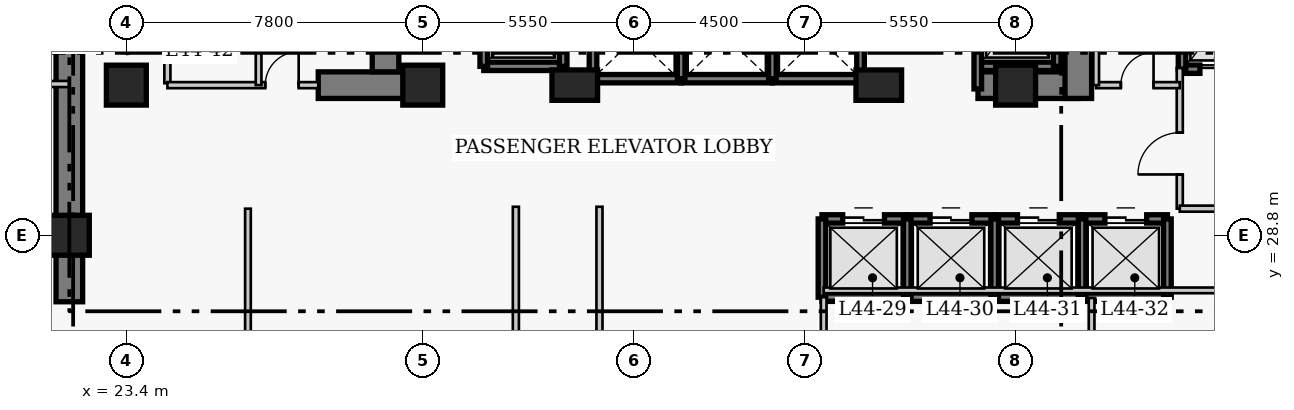
"""IFC4 building model, lengths in metres.
Left out: names, types, materials, properties, quantities, classifications, styles, units other than length and angle.
Written with IfcOpenShell. Run it as: python <this file> out.ifc"""

import sys

from ifc_helpers import new_model, si_unit, direction, frame, frame_2d, origin, origin_2d, place, context, subcontext, project, spatial, rectangle, extrude, element, fill, save


model = new_model("IFC4")
c1 = context("Model", 3, precision=1e-05, world=origin(), true_north=direction((0.0, 1.0)))
c2 = subcontext(c1, "Body", "Model", "MODEL_VIEW")
j1 = project(units=[si_unit("LENGTHUNIT", "METRE"), si_unit("PLANEANGLEUNIT", "RADIAN")], contexts=[c1])
p1 = place(None, origin())
s1 = spatial("IfcSite", under=j1, at=p1, CompositionType="ELEMENT")
p2 = place(p1, origin())
s2 = spatial("IfcBuilding", under=s1, at=p2, CompositionType="ELEMENT")
p3 = place(p2, frame((0.0, 0.0, 176.4)))
s3 = spatial("IfcBuildingStorey", under=s2, at=p3, CompositionType="ELEMENT", Elevation=176.4)
p4 = place(p3, frame((21.9, 27.05, 0.0), z_axis=(0.0, 0.0, 1.0), x_axis=(0.0, 1.0, 0.0)))
e1 = element("IfcWall", 1, at=p4, inside=s3, PredefinedType="SHEAR", context=c2, shape_type="SweptSolid", body=[
    extrude(rectangle(XDim=13.62, YDim=0.7, at=frame_2d((6.81, 0.0))), origin(), (0.0, 0.0, 1.0), 3.8),
])
p5 = place(p3, frame((28.45, 32.75, 0.0), z_axis=(0.0, 0.0, 1.0), x_axis=(1.0, 0.0, 0.0)))
e2 = element("IfcWall", 2, at=p5, inside=s3, PredefinedType="SHEAR", context=c2, shape_type="SweptSolid", body=[
    extrude(rectangle(XDim=2.4, YDim=0.7, at=frame_2d((1.2, 0.0))), origin(), (0.0, 0.0, 1.0), 3.8),
])
p6 = place(p3, frame((45.81, 32.75, 0.0), z_axis=(0.0, 0.0, 1.0), x_axis=(1.0, 0.0, 0.0)))
e3 = element("IfcWall", 3, at=p6, inside=s3, PredefinedType="SHEAR", context=c2, shape_type="SweptSolid", body=[
    extrude(rectangle(XDim=2.64, YDim=0.7, at=frame_2d((1.32, 0.0))), origin(), (0.0, 0.0, 1.0), 3.8),
])
p7 = place(p3, frame((30.22, 33.1, 0.0), z_axis=(0.0, 0.0, 1.0), x_axis=(0.0, 1.0, 0.0)))
e4 = element("IfcWall", 4, at=p7, inside=s3, PredefinedType="SHEAR", context=c2, shape_type="SweptSolid", body=[
    extrude(rectangle(XDim=7.22, YDim=0.7, at=frame_2d((3.61, 0.0))), origin(), (0.0, 0.0, 1.0), 3.8),
])
p8 = place(p3, frame((48.45, 32.4, 0.0), z_axis=(0.0, 0.0, 1.0), x_axis=(0.0, 1.0, 0.0)))
e5 = element("IfcWall", 5, at=p8, inside=s3, PredefinedType="SHEAR", context=c2, shape_type="SweptSolid", body=[
    extrude(rectangle(XDim=7.92, YDim=0.7, at=frame_2d((3.96, 0.0))), origin(), (0.0, 0.0, 1.0), 3.8),
])
p9 = place(p8, frame((5.8, 0.0, 0.0)))
e6 = element("IfcOpeningElement", 6, at=p9, cuts=e5, PredefinedType="OPENING", context=c2, shape_type="SweptSolid", body=[
    extrude(rectangle(XDim=1.1, YDim=2.15, at=frame_2d((0.55, 1.075))), frame((0.0, 0.36, 0.0), z_axis=(0.0, -1.0, 0.0), x_axis=(1.0, 0.0, 0.0)), (0.0, 0.0, 1.0), 0.72),
])
for number, where, z_axis, x_axis in (
    (7, (21.9, 28.8, 0.0), (0.0, 0.0, 1.0), (1.0, 0.0, 0.0)),
    (8, (23.4, 32.75, 0.0), (0.0, 0.0, 1.0), (1.0, 0.0, 0.0)),
    (9, (31.2, 32.75, 0.0), (0.0, 0.0, 1.0), (1.0, 0.0, 0.0)),
):
    element("IfcColumn", number, at=place(p3, frame(where, z_axis=z_axis, x_axis=x_axis)), inside=s3, PredefinedType="COLUMN", context=c2, shape_type="SweptSolid", body=[
        extrude(rectangle(XDim=1.05, YDim=1.05, at=origin_2d()), origin(), (0.0, 0.0, 1.0), 3.8),
    ])
for number, where, z_axis, x_axis in (
    (10, (35.2, 32.75, 0.0), (0.0, 0.0, 1.0), (1.0, 0.0, 0.0)),
    (11, (43.2, 32.75, 0.0), (0.0, 0.0, 1.0), (1.0, 0.0, 0.0)),
):
    element("IfcColumn", number, at=place(p3, frame(where, z_axis=z_axis, x_axis=x_axis)), inside=s3, PredefinedType="COLUMN", context=c2, shape_type="SweptSolid", body=[
        extrude(rectangle(XDim=1.2, YDim=0.8, at=origin_2d()), origin(), (0.0, 0.0, 1.0), 3.8),
    ])
p10 = place(p3, frame((46.8, 32.75, 0.0), z_axis=(0.0, 0.0, 1.0), x_axis=(1.0, 0.0, 0.0)))
e12 = element("IfcColumn", 12, at=p10, inside=s3, PredefinedType="COLUMN", context=c2, shape_type="SweptSolid", body=[
    extrude(rectangle(XDim=1.05, YDim=1.05, at=origin_2d()), origin(), (0.0, 0.0, 1.0), 3.8),
])
p11 = place(p3, frame((41.705, 29.23, 0.0), z_axis=(0.0, 0.0, 1.0), x_axis=(1.0, 0.0, 0.0)))
e13 = element("IfcWall", 13, at=p11, inside=s3, PredefinedType="SHEAR", context=c2, shape_type="SweptSolid", body=[
    extrude(rectangle(XDim=2.245, YDim=0.22, at=frame_2d((1.123, 0.0))), origin(), (0.0, 0.0, 1.0), 3.8),
])
p12 = place(p11, frame((0.545, 0.0, 0.0)))
e14 = element("IfcOpeningElement", 14, at=p12, cuts=e13, PredefinedType="OPENING", context=c2, shape_type="SweptSolid", body=[
    extrude(rectangle(XDim=1.1, YDim=2.15, at=frame_2d((0.55, 1.075))), frame((0.0, 0.12, 0.0), z_axis=(0.0, -1.0, 0.0), x_axis=(1.0, 0.0, 0.0)), (0.0, 0.0, 1.0), 0.24),
])
p13 = place(p3, frame((41.705, 27.17, 0.0), z_axis=(0.0, 0.0, 1.0), x_axis=(1.0, 0.0, 0.0)))
e15 = element("IfcWall", 15, at=p13, inside=s3, PredefinedType="SHEAR", context=c2, shape_type="SweptSolid", body=[
    extrude(rectangle(XDim=2.245, YDim=0.22, at=frame_2d((1.123, 0.0))), origin(), (0.0, 0.0, 1.0), 3.8),
])
p14 = place(p3, frame((41.705, 27.17, 0.0), z_axis=(0.0, 0.0, 1.0), x_axis=(0.0, 1.0, 0.0)))
e16 = element("IfcWall", 16, at=p14, inside=s3, PredefinedType="SHEAR", context=c2, shape_type="SweptSolid", body=[
    extrude(rectangle(XDim=2.06, YDim=0.2, at=frame_2d((1.03, 0.0))), origin(), (0.0, 0.0, 1.0), 3.8),
])
p15 = place(p3, frame((43.95, 29.23, 0.0), z_axis=(0.0, 0.0, 1.0), x_axis=(1.0, 0.0, 0.0)))
e17 = element("IfcWall", 17, at=p15, inside=s3, PredefinedType="SHEAR", context=c2, shape_type="SweptSolid", body=[
    extrude(rectangle(XDim=2.3, YDim=0.22, at=frame_2d((1.15, 0.0))), origin(), (0.0, 0.0, 1.0), 3.8),
])
p16 = place(p15, frame((0.6, 0.0, 0.0)))
e18 = element("IfcOpeningElement", 18, at=p16, cuts=e17, PredefinedType="OPENING", context=c2, shape_type="SweptSolid", body=[
    extrude(rectangle(XDim=1.1, YDim=2.15, at=frame_2d((0.55, 1.075))), frame((0.0, 0.12, 0.0), z_axis=(0.0, -1.0, 0.0), x_axis=(1.0, 0.0, 0.0)), (0.0, 0.0, 1.0), 0.24),
])
p17 = place(p3, frame((43.95, 27.17, 0.0), z_axis=(0.0, 0.0, 1.0), x_axis=(1.0, 0.0, 0.0)))
e19 = element("IfcWall", 19, at=p17, inside=s3, PredefinedType="SHEAR", context=c2, shape_type="SweptSolid", body=[
    extrude(rectangle(XDim=2.3, YDim=0.22, at=frame_2d((1.15, 0.0))), origin(), (0.0, 0.0, 1.0), 3.8),
])
p18 = place(p3, frame((43.95, 27.17, 0.0), z_axis=(0.0, 0.0, 1.0), x_axis=(0.0, 1.0, 0.0)))
e20 = element("IfcWall", 20, at=p18, inside=s3, PredefinedType="SHEAR", context=c2, shape_type="SweptSolid", body=[
    extrude(rectangle(XDim=2.06, YDim=0.2, at=frame_2d((1.03, 0.0))), origin(), (0.0, 0.0, 1.0), 3.8),
])
p19 = place(p3, frame((46.25, 29.23, 0.0), z_axis=(0.0, 0.0, 1.0), x_axis=(1.0, 0.0, 0.0)))
e21 = element("IfcWall", 21, at=p19, inside=s3, PredefinedType="SHEAR", context=c2, shape_type="SweptSolid", body=[
    extrude(rectangle(XDim=2.3, YDim=0.22, at=frame_2d((1.15, 0.0))), origin(), (0.0, 0.0, 1.0), 3.8),
])
p20 = place(p19, frame((0.6, 0.0, 0.0)))
e22 = element("IfcOpeningElement", 22, at=p20, cuts=e21, PredefinedType="OPENING", context=c2, shape_type="SweptSolid", body=[
    extrude(rectangle(XDim=1.1, YDim=2.15, at=frame_2d((0.55, 1.075))), frame((0.0, 0.12, 0.0), z_axis=(0.0, -1.0, 0.0), x_axis=(1.0, 0.0, 0.0)), (0.0, 0.0, 1.0), 0.24),
])
p21 = place(p3, frame((46.25, 27.17, 0.0), z_axis=(0.0, 0.0, 1.0), x_axis=(1.0, 0.0, 0.0)))
e23 = element("IfcWall", 23, at=p21, inside=s3, PredefinedType="SHEAR", context=c2, shape_type="SweptSolid", body=[
    extrude(rectangle(XDim=2.3, YDim=0.22, at=frame_2d((1.15, 0.0))), origin(), (0.0, 0.0, 1.0), 3.8),
])
p22 = place(p3, frame((46.25, 27.17, 0.0), z_axis=(0.0, 0.0, 1.0), x_axis=(0.0, 1.0, 0.0)))
e24 = element("IfcWall", 24, at=p22, inside=s3, PredefinedType="SHEAR", context=c2, shape_type="SweptSolid", body=[
    extrude(rectangle(XDim=2.06, YDim=0.2, at=frame_2d((1.03, 0.0))), origin(), (0.0, 0.0, 1.0), 3.8),
])
p23 = place(p3, frame((48.55, 29.23, 0.0), z_axis=(0.0, 0.0, 1.0), x_axis=(1.0, 0.0, 0.0)))
e25 = element("IfcWall", 25, at=p23, inside=s3, PredefinedType="SHEAR", context=c2, shape_type="SweptSolid", body=[
    extrude(rectangle(XDim=2.245, YDim=0.22, at=frame_2d((1.123, 0.0))), origin(), (0.0, 0.0, 1.0), 3.8),
])
p24 = place(p23, frame((0.6, 0.0, 0.0)))
e26 = element("IfcOpeningElement", 26, at=p24, cuts=e25, PredefinedType="OPENING", context=c2, shape_type="SweptSolid", body=[
    extrude(rectangle(XDim=1.1, YDim=2.15, at=frame_2d((0.55, 1.075))), frame((0.0, 0.12, 0.0), z_axis=(0.0, -1.0, 0.0), x_axis=(1.0, 0.0, 0.0)), (0.0, 0.0, 1.0), 0.24),
])
p25 = place(p3, frame((48.55, 27.17, 0.0), z_axis=(0.0, 0.0, 1.0), x_axis=(1.0, 0.0, 0.0)))
e27 = element("IfcWall", 27, at=p25, inside=s3, PredefinedType="SHEAR", context=c2, shape_type="SweptSolid", body=[
    extrude(rectangle(XDim=2.245, YDim=0.22, at=frame_2d((1.123, 0.0))), origin(), (0.0, 0.0, 1.0), 3.8),
])
for number, where, z_axis, x_axis in (
    (28, (48.55, 27.17, 0.0), (0.0, 0.0, 1.0), (0.0, 1.0, 0.0)),
    (29, (50.795, 27.17, 0.0), (0.0, 0.0, 1.0), (0.0, 1.0, 0.0)),
):
    element("IfcWall", number, at=place(p3, frame(where, z_axis=z_axis, x_axis=x_axis)), inside=s3, PredefinedType="SHEAR", context=c2, shape_type="SweptSolid", body=[
        extrude(rectangle(XDim=2.06, YDim=0.2, at=frame_2d((1.03, 0.0))), origin(), (0.0, 0.0, 1.0), 3.8),
    ])
p26 = place(p3, frame((35.68, 32.92, 0.0), z_axis=(0.0, 0.0, 1.0), x_axis=(1.0, 0.0, 0.0)))
e30 = element("IfcWall", 30, at=p26, inside=s3, PredefinedType="SHEAR", context=c2, shape_type="SweptSolid", body=[
    extrude(rectangle(XDim=2.32, YDim=0.22, at=frame_2d((1.16, 0.0))), origin(), (0.0, 0.0, 1.0), 3.8),
])
p27 = place(p3, frame((35.68, 32.92, 0.0), z_axis=(0.0, 0.0, 1.0), x_axis=(0.0, 1.0, 0.0)))
e31 = element("IfcWall", 31, at=p27, inside=s3, PredefinedType="SHEAR", context=c2, shape_type="SweptSolid", body=[
    extrude(rectangle(XDim=2.16, YDim=0.2, at=frame_2d((1.08, 0.0))), origin(), (0.0, 0.0, 1.0), 3.8),
])
p28 = place(p3, frame((38.0, 32.92, 0.0), z_axis=(0.0, 0.0, 1.0), x_axis=(1.0, 0.0, 0.0)))
e32 = element("IfcWall", 32, at=p28, inside=s3, PredefinedType="SHEAR", context=c2, shape_type="SweptSolid", body=[
    extrude(rectangle(XDim=2.4, YDim=0.22, at=frame_2d((1.2, 0.0))), origin(), (0.0, 0.0, 1.0), 3.8),
])
p29 = place(p3, frame((38.0, 32.92, 0.0), z_axis=(0.0, 0.0, 1.0), x_axis=(0.0, 1.0, 0.0)))
e33 = element("IfcWall", 33, at=p29, inside=s3, PredefinedType="SHEAR", context=c2, shape_type="SweptSolid", body=[
    extrude(rectangle(XDim=2.16, YDim=0.2, at=frame_2d((1.08, 0.0))), origin(), (0.0, 0.0, 1.0), 3.8),
])
p30 = place(p3, frame((40.4, 32.92, 0.0), z_axis=(0.0, 0.0, 1.0), x_axis=(1.0, 0.0, 0.0)))
e34 = element("IfcWall", 34, at=p30, inside=s3, PredefinedType="SHEAR", context=c2, shape_type="SweptSolid", body=[
    extrude(rectangle(XDim=2.32, YDim=0.22, at=frame_2d((1.16, 0.0))), origin(), (0.0, 0.0, 1.0), 3.8),
])
for number, where, z_axis, x_axis in (
    (35, (40.4, 32.92, 0.0), (0.0, 0.0, 1.0), (0.0, 1.0, 0.0)),
    (36, (42.72, 32.92, 0.0), (0.0, 0.0, 1.0), (0.0, 1.0, 0.0)),
):
    element("IfcWall", number, at=place(p3, frame(where, z_axis=z_axis, x_axis=x_axis)), inside=s3, PredefinedType="SHEAR", context=c2, shape_type="SweptSolid", body=[
        extrude(rectangle(XDim=2.16, YDim=0.2, at=frame_2d((1.08, 0.0))), origin(), (0.0, 0.0, 1.0), 3.8),
    ])
p31 = place(p3, frame((51.18, 33.17, 0.0), z_axis=(0.0, 0.0, 1.0), x_axis=(1.0, 0.0, 0.0)))
e37 = element("IfcWall", 37, at=p31, inside=s3, PredefinedType="SHEAR", context=c2, shape_type="SweptSolid", body=[
    extrude(rectangle(XDim=2.42, YDim=0.22, at=frame_2d((1.21, 0.0))), origin(), (0.0, 0.0, 1.0), 3.8),
])
p32 = place(p31, frame((0.47, 0.0, 0.0)))
e38 = element("IfcOpeningElement", 38, at=p32, cuts=e37, PredefinedType="OPENING", context=c2, shape_type="SweptSolid", body=[
    extrude(rectangle(XDim=1.3, YDim=2.15, at=frame_2d((0.65, 1.075))), frame((0.0, 0.12, 0.0), z_axis=(0.0, -1.0, 0.0), x_axis=(1.0, 0.0, 0.0)), (0.0, 0.0, 1.0), 0.24),
])
p33 = place(p3, frame((51.18, 33.17, 0.0), z_axis=(0.0, 0.0, 1.0), x_axis=(0.0, 1.0, 0.0)))
e39 = element("IfcWall", 39, at=p33, inside=s3, PredefinedType="SHEAR", context=c2, shape_type="SweptSolid", body=[
    extrude(rectangle(XDim=2.86, YDim=0.2, at=frame_2d((1.43, 0.0))), origin(), (0.0, 0.0, 1.0), 3.8),
])
p34 = place(p3, frame((32.805, 33.245, 0.0), z_axis=(0.0, 0.0, 1.0), x_axis=(1.0, 0.0, 0.0)))
e40 = element("IfcWall", 40, at=p34, inside=s3, PredefinedType="SHEAR", context=c2, shape_type="SweptSolid", body=[
    extrude(rectangle(XDim=2.09, YDim=0.22, at=frame_2d((1.045, 0.0))), origin(), (0.0, 0.0, 1.0), 3.8),
])
for number, where, z_axis, x_axis in (
    (41, (32.805, 33.245, 0.0), (0.0, 0.0, 1.0), (0.0, 1.0, 0.0)),
    (42, (34.895, 33.245, 0.0), (0.0, 0.0, 1.0), (0.0, 1.0, 0.0)),
):
    element("IfcWall", number, at=place(p3, frame(where, z_axis=z_axis, x_axis=x_axis)), inside=s3, PredefinedType="SHEAR", context=c2, shape_type="SweptSolid", body=[
        extrude(rectangle(XDim=2.91, YDim=0.2, at=frame_2d((1.455, 0.0))), origin(), (0.0, 0.0, 1.0), 3.8),
    ])
p35 = place(p3, frame((45.805, 33.245, 0.0), z_axis=(0.0, 0.0, 1.0), x_axis=(1.0, 0.0, 0.0)))
e43 = element("IfcWall", 43, at=p35, inside=s3, PredefinedType="SHEAR", context=c2, shape_type="SweptSolid", body=[
    extrude(rectangle(XDim=2.09, YDim=0.22, at=frame_2d((1.045, 0.0))), origin(), (0.0, 0.0, 1.0), 3.8),
])
p36 = place(p3, frame((45.805, 32.65, 0.0), z_axis=(0.0, 0.0, 1.0), x_axis=(0.0, 1.0, 0.0)))
e44 = element("IfcWall", 44, at=p36, inside=s3, PredefinedType="SHEAR", context=c2, shape_type="SweptSolid", body=[
    extrude(rectangle(XDim=3.505, YDim=0.2, at=frame_2d((1.752, 0.0))), origin(), (0.0, 0.0, 1.0), 3.8),
])
p37 = place(p3, frame((47.895, 33.245, 0.0), z_axis=(0.0, 0.0, 1.0), x_axis=(0.0, 1.0, 0.0)))
e45 = element("IfcWall", 45, at=p37, inside=s3, PredefinedType="SHEAR", context=c2, shape_type="SweptSolid", body=[
    extrude(rectangle(XDim=2.91, YDim=0.2, at=frame_2d((1.455, 0.0))), origin(), (0.0, 0.0, 1.0), 3.8),
])
p38 = place(p3, frame((24.48, 32.8, 0.0), z_axis=(0.0, 0.0, 1.0), x_axis=(0.0, 1.0, 0.0)))
e46 = element("IfcWall", 46, at=p38, inside=s3, PredefinedType="PARTITIONING", context=c2, shape_type="SweptSolid", body=[
    extrude(rectangle(XDim=3.57, YDim=0.16, at=frame_2d((1.785, 0.0))), origin(), (0.0, 0.0, 1.0), 3.55),
])
p39 = place(p38, frame((1.604, 0.0, 0.0)))
e47 = element("IfcOpeningElement", 47, at=p39, cuts=e46, PredefinedType="OPENING", context=c2, shape_type="SweptSolid", body=[
    extrude(rectangle(XDim=0.9, YDim=2.1, at=frame_2d((0.45, 1.05))), frame((0.0, 0.09, 0.0), z_axis=(0.0, -1.0, 0.0), x_axis=(1.0, 0.0, 0.0)), (0.0, 0.0, 1.0), 0.18),
])
p40 = place(p3, frame((51.12, 29.5, 0.0), z_axis=(0.0, 0.0, 1.0), x_axis=(0.0, 1.0, 0.0)))
e48 = element("IfcWall", 48, at=p40, inside=s3, PredefinedType="PARTITIONING", context=c2, shape_type="SweptSolid", body=[
    extrude(rectangle(XDim=3.7, YDim=0.16, at=frame_2d((1.85, 0.0))), origin(), (0.0, 0.0, 1.0), 3.55),
])
p41 = place(p40, frame((0.9, 0.0, 0.0)))
e49 = element("IfcOpeningElement", 49, at=p41, cuts=e48, PredefinedType="OPENING", context=c2, shape_type="SweptSolid", body=[
    extrude(rectangle(XDim=1.1, YDim=2.15, at=frame_2d((0.55, 1.075))), frame((0.0, 0.09, 0.0), z_axis=(0.0, -1.0, 0.0), x_axis=(1.0, 0.0, 0.0)), (0.0, 0.0, 1.0), 0.18),
])
p42 = place(p3, frame((51.12, 29.5, 0.0), z_axis=(0.0, 0.0, 1.0), x_axis=(1.0, 0.0, 0.0)))
e50 = element("IfcWall", 50, at=p42, inside=s3, PredefinedType="PARTITIONING", context=c2, shape_type="SweptSolid", body=[
    extrude(rectangle(XDim=5.63, YDim=0.16, at=frame_2d((2.815, 0.0))), origin(), (0.0, 0.0, 1.0), 3.55),
])
p43 = place(p3, frame((24.48, 32.75, 0.0), z_axis=(0.0, 0.0, 1.0), x_axis=(1.0, 0.0, 0.0)))
e51 = element("IfcWall", 51, at=p43, inside=s3, PredefinedType="PARTITIONING", context=c2, shape_type="SweptSolid", body=[
    extrude(rectangle(XDim=3.97, YDim=0.16, at=frame_2d((1.985, 0.0))), origin(), (0.0, 0.0, 1.0), 3.55),
])
p44 = place(p43, frame((2.575, 0.0, 0.0)))
e52 = element("IfcOpeningElement", 52, at=p44, cuts=e51, PredefinedType="OPENING", context=c2, shape_type="SweptSolid", body=[
    extrude(rectangle(XDim=0.88, YDim=2.05, at=frame_2d((0.44, 1.025))), frame((0.0, 0.09, 0.0), z_axis=(0.0, -1.0, 0.0), x_axis=(1.0, 0.0, 0.0)), (0.0, 0.0, 1.0), 0.18),
])
p45 = place(p3, frame((48.92, 32.75, 0.0), z_axis=(0.0, 0.0, 1.0), x_axis=(1.0, 0.0, 0.0)))
e53 = element("IfcWall", 53, at=p45, inside=s3, PredefinedType="PARTITIONING", context=c2, shape_type="SweptSolid", body=[
    extrude(rectangle(XDim=2.2, YDim=0.16, at=frame_2d((1.1, 0.0))), origin(), (0.0, 0.0, 1.0), 3.55),
])
p46 = place(p45, frame((0.65, 0.0, 0.0)))
e54 = element("IfcOpeningElement", 54, at=p46, cuts=e53, PredefinedType="OPENING", context=c2, shape_type="SweptSolid", body=[
    extrude(rectangle(XDim=0.86, YDim=2.05, at=frame_2d((0.43, 1.025))), frame((0.0, 0.09, 0.0), z_axis=(0.0, -1.0, 0.0), x_axis=(1.0, 0.0, 0.0)), (0.0, 0.0, 1.0), 0.18),
])
for number, where, z_axis, x_axis in (
    (55, (48.92, 32.75, 0.0), (0.0, 0.0, 1.0), (0.0, 1.0, 0.0)),
    (56, (26.88, 32.75, 0.0), (0.0, 0.0, 1.0), (0.0, 1.0, 0.0)),
):
    element("IfcWall", number, at=place(p3, frame(where, z_axis=z_axis, x_axis=x_axis)), inside=s3, PredefinedType="PARTITIONING", context=c2, shape_type="SweptSolid", body=[
        extrude(rectangle(XDim=3.62, YDim=0.15, at=frame_2d((1.81, 0.0))), origin(), (0.0, 0.0, 1.0), 3.55),
    ])
for number, where, z_axis, x_axis in (
    (57, (33.65, 17.26, 0.0), (0.0, 0.0, 1.0), (0.0, 1.0, 0.0)),
    (58, (35.85, 17.26, 0.0), (0.0, 0.0, 1.0), (0.0, 1.0, 0.0)),
):
    element("IfcWall", number, at=place(p3, frame(where, z_axis=z_axis, x_axis=x_axis)), inside=s3, PredefinedType="PARTITIONING", context=c2, shape_type="SweptSolid", body=[
        extrude(rectangle(XDim=12.29, YDim=0.16, at=frame_2d((6.145, 0.0))), origin(), (0.0, 0.0, 1.0), 3.55),
    ])
p47 = place(p3, frame((20.46, 32.78, 0.0), z_axis=(0.0, 0.0, 1.0), x_axis=(1.0, 0.0, 0.0)))
e59 = element("IfcWall", 59, at=p47, inside=s3, PredefinedType="PARTITIONING", context=c2, shape_type="SweptSolid", body=[
    extrude(rectangle(XDim=1.44, YDim=0.16, at=frame_2d((0.72, 0.0))), origin(), (0.0, 0.0, 1.0), 3.55),
])
p48 = place(p3, frame((26.6, 17.26, 0.0), z_axis=(0.0, 0.0, 1.0), x_axis=(0.0, 1.0, 0.0)))
e60 = element("IfcWall", 60, at=p48, inside=s3, PredefinedType="PARTITIONING", context=c2, shape_type="SweptSolid", body=[
    extrude(rectangle(XDim=12.24, YDim=0.15, at=frame_2d((6.12, 0.0))), origin(), (0.0, 0.0, 1.0), 3.55),
])
p49 = place(p3, frame((41.75, 17.26, 0.0), z_axis=(0.0, 0.0, 1.0), x_axis=(0.0, 1.0, 0.0)))
e61 = element("IfcWall", 61, at=p49, inside=s3, PredefinedType="PARTITIONING", context=c2, shape_type="SweptSolid", body=[
    extrude(rectangle(XDim=9.91, YDim=0.15, at=frame_2d((4.955, 0.0))), origin(), (0.0, 0.0, 1.0), 3.55),
])
p50 = place(p3, frame((48.8, 17.26, 0.0), z_axis=(0.0, 0.0, 1.0), x_axis=(0.0, 1.0, 0.0)))
e62 = element("IfcWall", 62, at=p50, inside=s3, PredefinedType="PARTITIONING", context=c2, shape_type="SweptSolid", body=[
    extrude(rectangle(XDim=9.89, YDim=0.15, at=frame_2d((4.945, 0.0))), origin(), (0.0, 0.0, 1.0), 3.55),
])
p51 = place(p3, frame((41.75, 27.35, 0.0), z_axis=(0.0, 0.0, 1.0), x_axis=(1.0, 0.0, 0.0)))
e63 = element("IfcWall", 63, at=p51, inside=s3, PredefinedType="PARTITIONING", context=c2, shape_type="SweptSolid", body=[
    extrude(rectangle(XDim=17.39, YDim=0.15, at=frame_2d((8.695, 0.0))), origin(), (0.0, 0.0, 1.0), 3.55),
])
p52 = place(p12, origin())
e64 = element("IfcDoor", 64, at=p52, inside=s3, OperationType="DOUBLE_DOOR_SLIDING", PredefinedType="DOOR", context=c2, shape_type="SweptSolid", body=[
    extrude(rectangle(XDim=1.1, YDim=2.15, at=frame_2d((0.55, 1.075))), frame((0.0, 0.025, 0.0), z_axis=(0.0, -1.0, 0.0), x_axis=(1.0, 0.0, 0.0)), (0.0, 0.0, 1.0), 0.05),
])
fill(e14, e64)
p53 = place(p16, origin())
e65 = element("IfcDoor", 65, at=p53, inside=s3, OperationType="DOUBLE_DOOR_SLIDING", PredefinedType="DOOR", context=c2, shape_type="SweptSolid", body=[
    extrude(rectangle(XDim=1.1, YDim=2.15, at=frame_2d((0.55, 1.075))), frame((0.0, 0.025, 0.0), z_axis=(0.0, -1.0, 0.0), x_axis=(1.0, 0.0, 0.0)), (0.0, 0.0, 1.0), 0.05),
])
fill(e18, e65)
p54 = place(p20, origin())
e66 = element("IfcDoor", 66, at=p54, inside=s3, OperationType="DOUBLE_DOOR_SLIDING", PredefinedType="DOOR", context=c2, shape_type="SweptSolid", body=[
    extrude(rectangle(XDim=1.1, YDim=2.15, at=frame_2d((0.55, 1.075))), frame((0.0, 0.025, 0.0), z_axis=(0.0, -1.0, 0.0), x_axis=(1.0, 0.0, 0.0)), (0.0, 0.0, 1.0), 0.05),
])
fill(e22, e66)
p55 = place(p24, origin())
e67 = element("IfcDoor", 67, at=p55, inside=s3, OperationType="DOUBLE_DOOR_SLIDING", PredefinedType="DOOR", context=c2, shape_type="SweptSolid", body=[
    extrude(rectangle(XDim=1.1, YDim=2.15, at=frame_2d((0.55, 1.075))), frame((0.0, 0.025, 0.0), z_axis=(0.0, -1.0, 0.0), x_axis=(1.0, 0.0, 0.0)), (0.0, 0.0, 1.0), 0.05),
])
fill(e26, e67)
p56 = place(p32, origin())
e68 = element("IfcDoor", 68, at=p56, inside=s3, OperationType="DOUBLE_DOOR_SLIDING", PredefinedType="DOOR", context=c2, shape_type="SweptSolid", body=[
    extrude(rectangle(XDim=1.3, YDim=2.15, at=frame_2d((0.65, 1.075))), frame((0.0, 0.025, 0.0), z_axis=(0.0, -1.0, 0.0), x_axis=(1.0, 0.0, 0.0)), (0.0, 0.0, 1.0), 0.05),
])
fill(e38, e68)
p57 = place(p41, origin())
e69 = element("IfcDoor", 69, at=p57, inside=s3, OperationType="SINGLE_SWING_LEFT", PredefinedType="DOOR", context=c2, shape_type="SweptSolid", body=[
    extrude(rectangle(XDim=1.1, YDim=2.15, at=frame_2d((0.55, 1.075))), frame((0.0, 0.025, 0.0), z_axis=(0.0, -1.0, 0.0), x_axis=(1.0, 0.0, 0.0)), (0.0, 0.0, 1.0), 0.05),
])
fill(e49, e69)
p58 = place(p44, origin())
e70 = element("IfcDoor", 70, at=p58, inside=s3, OperationType="SINGLE_SWING_RIGHT", PredefinedType="DOOR", context=c2, shape_type="SweptSolid", body=[
    extrude(rectangle(XDim=0.88, YDim=2.05, at=frame_2d((0.44, 1.025))), frame((0.0, 0.025, 0.0), z_axis=(0.0, -1.0, 0.0), x_axis=(1.0, 0.0, 0.0)), (0.0, 0.0, 1.0), 0.05),
])
fill(e52, e70)
p59 = place(p46, origin())
e71 = element("IfcDoor", 71, at=p59, inside=s3, OperationType="SINGLE_SWING_RIGHT", PredefinedType="DOOR", context=c2, shape_type="SweptSolid", body=[
    extrude(rectangle(XDim=0.86, YDim=2.05, at=frame_2d((0.43, 1.025))), frame((0.0, 0.025, 0.0), z_axis=(0.0, -1.0, 0.0), x_axis=(1.0, 0.0, 0.0)), (0.0, 0.0, 1.0), 0.05),
])
fill(e54, e71)
save(model, sys.argv[1])
